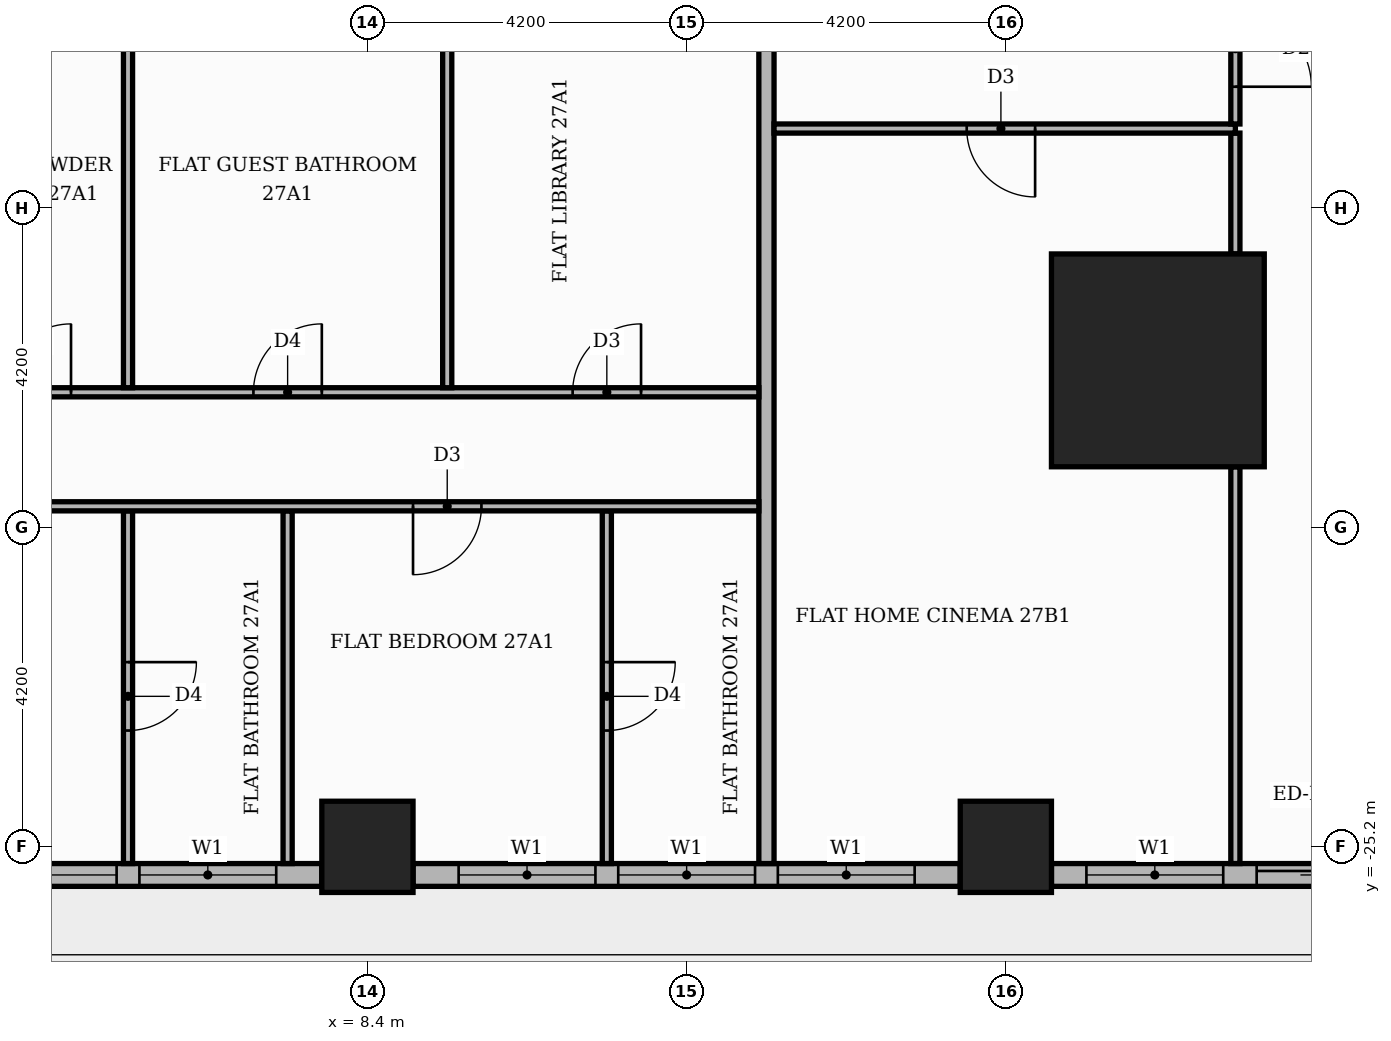
"""IFC4 building model, lengths in metres.
Left out: names, types, materials, properties, quantities, classifications, styles, units other than length and angle.
Written with IfcOpenShell. Run it as: python <this file> out.ifc"""

import sys

from ifc_helpers import new_model, si_unit, direction, frame, frame_2d, origin, origin_2d, place, context, subcontext, project, spatial, rectangle, extrude, element, fill, save


model = new_model("IFC4")
c1 = context("Model", 3, precision=1e-05, world=origin(), true_north=direction((0.0, 1.0)))
c2 = subcontext(c1, "Body", "Model", "MODEL_VIEW")
j1 = project(units=[si_unit("LENGTHUNIT", "METRE"), si_unit("PLANEANGLEUNIT", "RADIAN")], contexts=[c1])
p1 = place(None, origin())
s1 = spatial("IfcSite", under=j1, at=p1, CompositionType="ELEMENT")
p2 = place(p1, origin())
s2 = spatial("IfcBuilding", under=s1, at=p2, CompositionType="ELEMENT")
p3 = place(p2, frame((0.0, 0.0, 114.3)))
s3 = spatial("IfcBuildingStorey", under=s2, at=p3, CompositionType="ELEMENT", Elevation=114.3)
p4 = place(p3, frame((18.8, -18.8, 0.0), z_axis=(0.0, 0.0, 1.0), x_axis=(1.0, 0.0, 0.0)))
e1 = element("IfcColumn", 1, at=p4, inside=s3, PredefinedType="COLUMN", context=c2, shape_type="SweptSolid", body=[
    extrude(rectangle(XDim=2.8, YDim=2.8, at=origin_2d()), origin(), (0.0, 0.0, 1.0), 3.9),
])
for number, where, z_axis, x_axis in (
    (2, (8.4, -25.2, 0.0), (0.0, 0.0, 1.0), (1.0, 0.0, 0.0)),
    (3, (16.8, -25.2, 0.0), (0.0, 0.0, 1.0), (1.0, 0.0, 0.0)),
):
    element("IfcColumn", number, at=place(p3, frame(where, z_axis=z_axis, x_axis=x_axis)), inside=s3, PredefinedType="COLUMN", context=c2, shape_type="SweptSolid", body=[
        extrude(rectangle(XDim=1.2, YDim=1.2, at=origin_2d()), origin(), (0.0, 0.0, 1.0), 3.9),
    ])
p5 = place(p3, frame((0.6, -25.57, 0.0), z_axis=(0.0, 0.0, 1.0), x_axis=(1.0, 0.0, 0.0)))
e4 = element("IfcWall", 4, at=p5, inside=s3, PredefinedType="STANDARD", context=c2, shape_type="SweptSolid", body=[
    extrude(rectangle(XDim=7.2, YDim=0.3, at=frame_2d((3.6, 0.0))), origin(), (0.0, 0.0, 1.0), 3.48),
])
p6 = place(p5, frame((0.6, 0.0, 0.9)))
e5 = element("IfcOpeningElement", 5, at=p6, cuts=e4, PredefinedType="OPENING", context=c2, shape_type="SweptSolid", body=[
    extrude(rectangle(XDim=3.9, YDim=2.1, at=frame_2d((1.95, 1.05))), frame((0.0, 0.16, 0.0), z_axis=(0.0, -1.0, 0.0), x_axis=(1.0, 0.0, 0.0)), (0.0, 0.0, 1.0), 0.32),
])
p7 = place(p5, frame((4.8, 0.0, 0.9)))
e6 = element("IfcOpeningElement", 6, at=p7, cuts=e4, PredefinedType="OPENING", context=c2, shape_type="SweptSolid", body=[
    extrude(rectangle(XDim=1.8, YDim=2.1, at=frame_2d((0.9, 1.05))), frame((0.0, 0.16, 0.0), z_axis=(0.0, -1.0, 0.0), x_axis=(1.0, 0.0, 0.0)), (0.0, 0.0, 1.0), 0.32),
])
p8 = place(p3, frame((9.0, -25.57, 0.0), z_axis=(0.0, 0.0, 1.0), x_axis=(1.0, 0.0, 0.0)))
e7 = element("IfcWall", 7, at=p8, inside=s3, PredefinedType="STANDARD", context=c2, shape_type="SweptSolid", body=[
    extrude(rectangle(XDim=7.2, YDim=0.3, at=frame_2d((3.6, 0.0))), origin(), (0.0, 0.0, 1.0), 3.48),
])
p9 = place(p8, frame((0.6, 0.0, 0.9)))
e8 = element("IfcOpeningElement", 8, at=p9, cuts=e7, PredefinedType="OPENING", context=c2, shape_type="SweptSolid", body=[
    extrude(rectangle(XDim=1.8, YDim=2.1, at=frame_2d((0.9, 1.05))), frame((0.0, 0.16, 0.0), z_axis=(0.0, -1.0, 0.0), x_axis=(1.0, 0.0, 0.0)), (0.0, 0.0, 1.0), 0.32),
])
p10 = place(p8, frame((2.7, 0.0, 0.9)))
e9 = element("IfcOpeningElement", 9, at=p10, cuts=e7, PredefinedType="OPENING", context=c2, shape_type="SweptSolid", body=[
    extrude(rectangle(XDim=1.8, YDim=2.1, at=frame_2d((0.9, 1.05))), frame((0.0, 0.16, 0.0), z_axis=(0.0, -1.0, 0.0), x_axis=(1.0, 0.0, 0.0)), (0.0, 0.0, 1.0), 0.32),
])
p11 = place(p8, frame((4.8, 0.0, 0.9)))
e10 = element("IfcOpeningElement", 10, at=p11, cuts=e7, PredefinedType="OPENING", context=c2, shape_type="SweptSolid", body=[
    extrude(rectangle(XDim=1.8, YDim=2.1, at=frame_2d((0.9, 1.05))), frame((0.0, 0.16, 0.0), z_axis=(0.0, -1.0, 0.0), x_axis=(1.0, 0.0, 0.0)), (0.0, 0.0, 1.0), 0.32),
])
p12 = place(p3, frame((17.4, -25.57, 0.0), z_axis=(0.0, 0.0, 1.0), x_axis=(1.0, 0.0, 0.0)))
e11 = element("IfcWall", 11, at=p12, inside=s3, PredefinedType="STANDARD", context=c2, shape_type="SweptSolid", body=[
    extrude(rectangle(XDim=4.82, YDim=0.3, at=frame_2d((2.41, 0.0))), origin(), (0.0, 0.0, 1.0), 3.48),
])
p13 = place(p12, frame((2.7, 0.0, 0.0)))
e12 = element("IfcOpeningElement", 12, at=p13, cuts=e11, PredefinedType="OPENING", context=c2, shape_type="SweptSolid", body=[
    extrude(rectangle(XDim=1.8, YDim=2.4, at=frame_2d((0.9, 1.2))), frame((0.0, 0.16, 0.0), z_axis=(0.0, -1.0, 0.0), x_axis=(1.0, 0.0, 0.0)), (0.0, 0.0, 1.0), 0.32),
])
p14 = place(p12, frame((0.46, 0.0, 0.9)))
e13 = element("IfcOpeningElement", 13, at=p14, cuts=e11, PredefinedType="OPENING", context=c2, shape_type="SweptSolid", body=[
    extrude(rectangle(XDim=1.8, YDim=2.1, at=frame_2d((0.9, 1.05))), frame((0.0, 0.16, 0.0), z_axis=(0.0, -1.0, 0.0), x_axis=(1.0, 0.0, 0.0)), (0.0, 0.0, 1.0), 0.32),
])
p15 = place(p3, frame((5.25, -25.42, 0.0), z_axis=(0.0, 0.0, 1.0), x_axis=(0.0, 1.0, 0.0)))
e14 = element("IfcWall", 14, at=p15, inside=s3, PredefinedType="PARTITIONING", context=c2, shape_type="SweptSolid", body=[
    extrude(rectangle(XDim=4.64, YDim=0.12, at=frame_2d((2.32, 0.0))), origin(), (0.0, 0.0, 1.0), 3.48),
])
p16 = place(p15, frame((1.75, 0.0, 0.0)))
e15 = element("IfcOpeningElement", 15, at=p16, cuts=e14, PredefinedType="OPENING", context=c2, shape_type="SweptSolid", body=[
    extrude(rectangle(XDim=0.9, YDim=2.1, at=frame_2d((0.45, 1.05))), frame((0.0, 0.07, 0.0), z_axis=(0.0, -1.0, 0.0), x_axis=(1.0, 0.0, 0.0)), (0.0, 0.0, 1.0), 0.14),
])
p17 = place(p3, frame((7.35, -25.42, 0.0), z_axis=(0.0, 0.0, 1.0), x_axis=(0.0, 1.0, 0.0)))
e16 = element("IfcWall", 16, at=p17, inside=s3, PredefinedType="PARTITIONING", context=c2, shape_type="SweptSolid", body=[
    extrude(rectangle(XDim=4.64, YDim=0.12, at=frame_2d((2.32, 0.0))), origin(), (0.0, 0.0, 1.0), 3.48),
])
p18 = place(p3, frame((11.55, -25.42, 0.0), z_axis=(0.0, 0.0, 1.0), x_axis=(0.0, 1.0, 0.0)))
e17 = element("IfcWall", 17, at=p18, inside=s3, PredefinedType="PARTITIONING", context=c2, shape_type="SweptSolid", body=[
    extrude(rectangle(XDim=4.64, YDim=0.12, at=frame_2d((2.32, 0.0))), origin(), (0.0, 0.0, 1.0), 3.48),
])
p19 = place(p18, frame((1.75, 0.0, 0.0)))
e18 = element("IfcOpeningElement", 18, at=p19, cuts=e17, PredefinedType="OPENING", context=c2, shape_type="SweptSolid", body=[
    extrude(rectangle(XDim=0.9, YDim=2.1, at=frame_2d((0.45, 1.05))), frame((0.0, 0.07, 0.0), z_axis=(0.0, -1.0, 0.0), x_axis=(1.0, 0.0, 0.0)), (0.0, 0.0, 1.0), 0.14),
])
p20 = place(p3, frame((13.65, -25.42, 0.0), z_axis=(0.0, 0.0, 1.0), x_axis=(0.0, 1.0, 0.0)))
e19 = element("IfcWall", 19, at=p20, inside=s3, PredefinedType="PARTITIONING", context=c2, shape_type="SweptSolid", body=[
    extrude(rectangle(XDim=11.67, YDim=0.2, at=frame_2d((5.835, 0.0))), origin(), (0.0, 0.0, 1.0), 3.48),
])
p21 = place(p3, frame((19.82, -25.42, 0.0), z_axis=(0.0, 0.0, 1.0), x_axis=(0.0, 1.0, 0.0)))
e20 = element("IfcWall", 20, at=p21, inside=s3, PredefinedType="PARTITIONING", context=c2, shape_type="SweptSolid", body=[
    extrude(rectangle(XDim=5.22, YDim=0.12, at=frame_2d((2.61, 0.0))), origin(), (0.0, 0.0, 1.0), 3.48),
])
p22 = place(p3, frame((-25.42, -20.72, 0.0), z_axis=(0.0, 0.0, 1.0), x_axis=(1.0, 0.0, 0.0)))
e21 = element("IfcWall", 21, at=p22, inside=s3, PredefinedType="PARTITIONING", context=c2, shape_type="SweptSolid", body=[
    extrude(rectangle(XDim=38.97, YDim=0.12, at=frame_2d((19.485, 0.0))), origin(), (0.0, 0.0, 1.0), 3.48),
])
p23 = place(p22, frame((10.22, 0.0, 0.0)))
e22 = element("IfcOpeningElement", 22, at=p23, cuts=e21, PredefinedType="OPENING", context=c2, shape_type="SweptSolid", body=[
    extrude(rectangle(XDim=1.0, YDim=2.1, at=frame_2d((0.5, 1.05))), frame((0.0, 0.07, 0.0), z_axis=(0.0, -1.0, 0.0), x_axis=(1.0, 0.0, 0.0)), (0.0, 0.0, 1.0), 0.14),
])
p24 = place(p22, frame((14.47, 0.0, 0.0)))
e23 = element("IfcOpeningElement", 23, at=p24, cuts=e21, PredefinedType="OPENING", context=c2, shape_type="SweptSolid", body=[
    extrude(rectangle(XDim=0.9, YDim=2.1, at=frame_2d((0.45, 1.05))), frame((0.0, 0.07, 0.0), z_axis=(0.0, -1.0, 0.0), x_axis=(1.0, 0.0, 0.0)), (0.0, 0.0, 1.0), 0.14),
])
p25 = place(p22, frame((23.92, 0.0, 0.0)))
e24 = element("IfcOpeningElement", 24, at=p25, cuts=e21, PredefinedType="OPENING", context=c2, shape_type="SweptSolid", body=[
    extrude(rectangle(XDim=0.9, YDim=2.1, at=frame_2d((0.45, 1.05))), frame((0.0, 0.07, 0.0), z_axis=(0.0, -1.0, 0.0), x_axis=(1.0, 0.0, 0.0)), (0.0, 0.0, 1.0), 0.14),
])
p26 = place(p22, frame((28.12, 0.0, 0.0)))
e25 = element("IfcOpeningElement", 25, at=p26, cuts=e21, PredefinedType="OPENING", context=c2, shape_type="SweptSolid", body=[
    extrude(rectangle(XDim=0.9, YDim=2.1, at=frame_2d((0.45, 1.05))), frame((0.0, 0.07, 0.0), z_axis=(0.0, -1.0, 0.0), x_axis=(1.0, 0.0, 0.0)), (0.0, 0.0, 1.0), 0.14),
])
p27 = place(p22, frame((34.42, 0.0, 0.0)))
e26 = element("IfcOpeningElement", 26, at=p27, cuts=e21, PredefinedType="OPENING", context=c2, shape_type="SweptSolid", body=[
    extrude(rectangle(XDim=0.9, YDim=2.1, at=frame_2d((0.45, 1.05))), frame((0.0, 0.07, 0.0), z_axis=(0.0, -1.0, 0.0), x_axis=(1.0, 0.0, 0.0)), (0.0, 0.0, 1.0), 0.14),
])
p28 = place(p3, frame((-9.45, -19.22, 0.0), z_axis=(0.0, 0.0, 1.0), x_axis=(1.0, 0.0, 0.0)))
e27 = element("IfcWall", 27, at=p28, inside=s3, PredefinedType="PARTITIONING", context=c2, shape_type="SweptSolid", body=[
    extrude(rectangle(XDim=23.0, YDim=0.12, at=frame_2d((11.5, 0.0))), origin(), (0.0, 0.0, 1.0), 3.48),
])
p29 = place(p28, frame((2.7, 0.0, 0.0)))
e28 = element("IfcOpeningElement", 28, at=p29, cuts=e27, PredefinedType="OPENING", context=c2, shape_type="SweptSolid", body=[
    extrude(rectangle(XDim=0.9, YDim=2.1, at=frame_2d((0.45, 1.05))), frame((0.0, 0.07, 0.0), z_axis=(0.0, -1.0, 0.0), x_axis=(1.0, 0.0, 0.0)), (0.0, 0.0, 1.0), 0.14),
])
p30 = place(p28, frame((8.85, 0.0, 0.0)))
e29 = element("IfcOpeningElement", 29, at=p30, cuts=e27, PredefinedType="OPENING", context=c2, shape_type="SweptSolid", body=[
    extrude(rectangle(XDim=0.9, YDim=2.1, at=frame_2d((0.45, 1.05))), frame((0.0, 0.07, 0.0), z_axis=(0.0, -1.0, 0.0), x_axis=(1.0, 0.0, 0.0)), (0.0, 0.0, 1.0), 0.14),
])
p31 = place(p28, frame((13.05, 0.0, 0.0)))
e30 = element("IfcOpeningElement", 30, at=p31, cuts=e27, PredefinedType="OPENING", context=c2, shape_type="SweptSolid", body=[
    extrude(rectangle(XDim=0.9, YDim=2.1, at=frame_2d((0.45, 1.05))), frame((0.0, 0.07, 0.0), z_axis=(0.0, -1.0, 0.0), x_axis=(1.0, 0.0, 0.0)), (0.0, 0.0, 1.0), 0.14),
])
p32 = place(p28, frame((16.35, 0.0, 0.0)))
e31 = element("IfcOpeningElement", 31, at=p32, cuts=e27, PredefinedType="OPENING", context=c2, shape_type="SweptSolid", body=[
    extrude(rectangle(XDim=0.9, YDim=2.1, at=frame_2d((0.45, 1.05))), frame((0.0, 0.07, 0.0), z_axis=(0.0, -1.0, 0.0), x_axis=(1.0, 0.0, 0.0)), (0.0, 0.0, 1.0), 0.14),
])
p33 = place(p28, frame((20.55, 0.0, 0.0)))
e32 = element("IfcOpeningElement", 32, at=p33, cuts=e27, PredefinedType="OPENING", context=c2, shape_type="SweptSolid", body=[
    extrude(rectangle(XDim=0.9, YDim=2.1, at=frame_2d((0.45, 1.05))), frame((0.0, 0.07, 0.0), z_axis=(0.0, -1.0, 0.0), x_axis=(1.0, 0.0, 0.0)), (0.0, 0.0, 1.0), 0.14),
])
for number, where, z_axis, x_axis in (
    (33, (5.25, -19.16, 0.0), (0.0, 0.0, 1.0), (0.0, 1.0, 0.0)),
    (34, (9.45, -19.16, 0.0), (0.0, 0.0, 1.0), (0.0, 1.0, 0.0)),
):
    element("IfcWall", number, at=place(p3, frame(where, z_axis=z_axis, x_axis=x_axis)), inside=s3, PredefinedType="PARTITIONING", context=c2, shape_type="SweptSolid", body=[
        extrude(rectangle(XDim=5.41, YDim=0.12, at=frame_2d((2.705, 0.0))), origin(), (0.0, 0.0, 1.0), 3.48),
    ])
p34 = place(p3, frame((19.82, -17.4, 0.0), z_axis=(0.0, 0.0, 1.0), x_axis=(0.0, 1.0, 0.0)))
e35 = element("IfcWall", 35, at=p34, inside=s3, PredefinedType="PARTITIONING", context=c2, shape_type="SweptSolid", body=[
    extrude(rectangle(XDim=1.59, YDim=0.12, at=frame_2d((0.795, 0.0))), origin(), (0.0, 0.0, 1.0), 3.48),
])
p35 = place(p3, frame((13.75, -15.75, 0.0), z_axis=(0.0, 0.0, 1.0), x_axis=(1.0, 0.0, 0.0)))
e36 = element("IfcWall", 36, at=p35, inside=s3, PredefinedType="PARTITIONING", context=c2, shape_type="SweptSolid", body=[
    extrude(rectangle(XDim=6.07, YDim=0.12, at=frame_2d((3.035, 0.0))), origin(), (0.0, 0.0, 1.0), 3.48),
])
p36 = place(p35, frame((2.535, 0.0, 0.0)))
e37 = element("IfcOpeningElement", 37, at=p36, cuts=e36, PredefinedType="OPENING", context=c2, shape_type="SweptSolid", body=[
    extrude(rectangle(XDim=0.9, YDim=2.1, at=frame_2d((0.45, 1.05))), frame((0.0, 0.07, 0.0), z_axis=(0.0, -1.0, 0.0), x_axis=(1.0, 0.0, 0.0)), (0.0, 0.0, 1.0), 0.14),
])
p37 = place(p3, frame((19.82, -15.69, 0.0), z_axis=(0.0, 0.0, 1.0), x_axis=(0.0, 1.0, 0.0)))
e38 = element("IfcWall", 38, at=p37, inside=s3, PredefinedType="PARTITIONING", context=c2, shape_type="SweptSolid", body=[
    extrude(rectangle(XDim=1.98, YDim=0.12, at=frame_2d((0.99, 0.0))), origin(), (0.0, 0.0, 1.0), 3.48),
])
p38 = place(p37, frame((0.49, 0.0, 0.0)))
e39 = element("IfcOpeningElement", 39, at=p38, cuts=e38, PredefinedType="OPENING", context=c2, shape_type="SweptSolid", body=[
    extrude(rectangle(XDim=1.0, YDim=2.1, at=frame_2d((0.5, 1.05))), frame((0.0, 0.07, 0.0), z_axis=(0.0, -1.0, 0.0), x_axis=(1.0, 0.0, 0.0)), (0.0, 0.0, 1.0), 0.14),
])
p39 = place(p6, origin())
e40 = element("IfcWindow", 40, at=p39, inside=s3, PartitioningType="SINGLE_PANEL", PredefinedType="WINDOW", context=c2, shape_type="SweptSolid", body=[
    extrude(rectangle(XDim=3.9, YDim=2.1, at=frame_2d((1.95, 1.05))), frame((0.0, 0.03, 0.0), z_axis=(0.0, -1.0, 0.0), x_axis=(1.0, 0.0, 0.0)), (0.0, 0.0, 1.0), 0.06),
])
fill(e5, e40)
p40 = place(p7, origin())
e41 = element("IfcWindow", 41, at=p40, inside=s3, PartitioningType="SINGLE_PANEL", PredefinedType="WINDOW", context=c2, shape_type="SweptSolid", body=[
    extrude(rectangle(XDim=1.8, YDim=2.1, at=frame_2d((0.9, 1.05))), frame((0.0, 0.03, 0.0), z_axis=(0.0, -1.0, 0.0), x_axis=(1.0, 0.0, 0.0)), (0.0, 0.0, 1.0), 0.06),
])
fill(e6, e41)
p41 = place(p9, origin())
e42 = element("IfcWindow", 42, at=p41, inside=s3, PartitioningType="SINGLE_PANEL", PredefinedType="WINDOW", context=c2, shape_type="SweptSolid", body=[
    extrude(rectangle(XDim=1.8, YDim=2.1, at=frame_2d((0.9, 1.05))), frame((0.0, 0.03, 0.0), z_axis=(0.0, -1.0, 0.0), x_axis=(1.0, 0.0, 0.0)), (0.0, 0.0, 1.0), 0.06),
])
fill(e8, e42)
p42 = place(p10, origin())
e43 = element("IfcWindow", 43, at=p42, inside=s3, PartitioningType="SINGLE_PANEL", PredefinedType="WINDOW", context=c2, shape_type="SweptSolid", body=[
    extrude(rectangle(XDim=1.8, YDim=2.1, at=frame_2d((0.9, 1.05))), frame((0.0, 0.03, 0.0), z_axis=(0.0, -1.0, 0.0), x_axis=(1.0, 0.0, 0.0)), (0.0, 0.0, 1.0), 0.06),
])
fill(e9, e43)
p43 = place(p11, origin())
e44 = element("IfcWindow", 44, at=p43, inside=s3, PartitioningType="SINGLE_PANEL", PredefinedType="WINDOW", context=c2, shape_type="SweptSolid", body=[
    extrude(rectangle(XDim=1.8, YDim=2.1, at=frame_2d((0.9, 1.05))), frame((0.0, 0.03, 0.0), z_axis=(0.0, -1.0, 0.0), x_axis=(1.0, 0.0, 0.0)), (0.0, 0.0, 1.0), 0.06),
])
fill(e10, e44)
p44 = place(p13, origin())
e45 = element("IfcDoor", 45, at=p44, inside=s3, OperationType="SLIDING_TO_LEFT", PredefinedType="DOOR", context=c2, shape_type="SweptSolid", body=[
    extrude(rectangle(XDim=1.8, YDim=2.4, at=frame_2d((0.9, 1.2))), frame((0.0, 0.025, 0.0), z_axis=(0.0, -1.0, 0.0), x_axis=(1.0, 0.0, 0.0)), (0.0, 0.0, 1.0), 0.05),
])
fill(e12, e45)
p45 = place(p14, origin())
e46 = element("IfcWindow", 46, at=p45, inside=s3, PartitioningType="SINGLE_PANEL", PredefinedType="WINDOW", context=c2, shape_type="SweptSolid", body=[
    extrude(rectangle(XDim=1.8, YDim=2.1, at=frame_2d((0.9, 1.05))), frame((0.0, 0.03, 0.0), z_axis=(0.0, -1.0, 0.0), x_axis=(1.0, 0.0, 0.0)), (0.0, 0.0, 1.0), 0.06),
])
fill(e13, e46)
p46 = place(p31, origin())
e47 = element("IfcDoor", 47, at=p46, inside=s3, OperationType="SINGLE_SWING_RIGHT", PredefinedType="DOOR", context=c2, shape_type="SweptSolid", body=[
    extrude(rectangle(XDim=0.9, YDim=2.1, at=frame_2d((0.45, 1.05))), frame((0.0, 0.025, 0.0), z_axis=(0.0, -1.0, 0.0), x_axis=(1.0, 0.0, 0.0)), (0.0, 0.0, 1.0), 0.05),
])
fill(e30, e47)
p47 = place(p32, origin())
e48 = element("IfcDoor", 48, at=p47, inside=s3, OperationType="SINGLE_SWING_RIGHT", PredefinedType="DOOR", context=c2, shape_type="SweptSolid", body=[
    extrude(rectangle(XDim=0.9, YDim=2.1, at=frame_2d((0.45, 1.05))), frame((0.0, 0.025, 0.0), z_axis=(0.0, -1.0, 0.0), x_axis=(1.0, 0.0, 0.0)), (0.0, 0.0, 1.0), 0.05),
])
fill(e31, e48)
p48 = place(p33, origin())
e49 = element("IfcDoor", 49, at=p48, inside=s3, OperationType="SINGLE_SWING_RIGHT", PredefinedType="DOOR", context=c2, shape_type="SweptSolid", body=[
    extrude(rectangle(XDim=0.9, YDim=2.1, at=frame_2d((0.45, 1.05))), frame((0.0, 0.025, 0.0), z_axis=(0.0, -1.0, 0.0), x_axis=(1.0, 0.0, 0.0)), (0.0, 0.0, 1.0), 0.05),
])
fill(e32, e49)
p49 = place(p16, frame((0.9, 0.0, 0.0), z_axis=(0.0, 0.0, 1.0), x_axis=(-1.0, 0.0, 0.0)))
e50 = element("IfcDoor", 50, at=p49, inside=s3, OperationType="SINGLE_SWING_RIGHT", PredefinedType="DOOR", context=c2, shape_type="SweptSolid", body=[
    extrude(rectangle(XDim=0.9, YDim=2.1, at=frame_2d((0.45, 1.05))), frame((0.0, 0.025, 0.0), z_axis=(0.0, -1.0, 0.0), x_axis=(1.0, 0.0, 0.0)), (0.0, 0.0, 1.0), 0.05),
])
fill(e15, e50)
p50 = place(p27, frame((0.9, 0.0, 0.0), z_axis=(0.0, 0.0, 1.0), x_axis=(-1.0, 0.0, 0.0)))
e51 = element("IfcDoor", 51, at=p50, inside=s3, OperationType="SINGLE_SWING_LEFT", PredefinedType="DOOR", context=c2, shape_type="SweptSolid", body=[
    extrude(rectangle(XDim=0.9, YDim=2.1, at=frame_2d((0.45, 1.05))), frame((0.0, 0.025, 0.0), z_axis=(0.0, -1.0, 0.0), x_axis=(1.0, 0.0, 0.0)), (0.0, 0.0, 1.0), 0.05),
])
fill(e26, e51)
p51 = place(p19, frame((0.9, 0.0, 0.0), z_axis=(0.0, 0.0, 1.0), x_axis=(-1.0, 0.0, 0.0)))
e52 = element("IfcDoor", 52, at=p51, inside=s3, OperationType="SINGLE_SWING_RIGHT", PredefinedType="DOOR", context=c2, shape_type="SweptSolid", body=[
    extrude(rectangle(XDim=0.9, YDim=2.1, at=frame_2d((0.45, 1.05))), frame((0.0, 0.025, 0.0), z_axis=(0.0, -1.0, 0.0), x_axis=(1.0, 0.0, 0.0)), (0.0, 0.0, 1.0), 0.05),
])
fill(e18, e52)
p52 = place(p36, frame((0.9, 0.0, 0.0), z_axis=(0.0, 0.0, 1.0), x_axis=(-1.0, 0.0, 0.0)))
e53 = element("IfcDoor", 53, at=p52, inside=s3, OperationType="SINGLE_SWING_RIGHT", PredefinedType="DOOR", context=c2, shape_type="SweptSolid", body=[
    extrude(rectangle(XDim=0.9, YDim=2.1, at=frame_2d((0.45, 1.05))), frame((0.0, 0.025, 0.0), z_axis=(0.0, -1.0, 0.0), x_axis=(1.0, 0.0, 0.0)), (0.0, 0.0, 1.0), 0.05),
])
fill(e37, e53)
p53 = place(p38, frame((1.0, 0.0, 0.0), z_axis=(0.0, 0.0, 1.0), x_axis=(-1.0, 0.0, 0.0)))
e54 = element("IfcDoor", 54, at=p53, inside=s3, OperationType="SINGLE_SWING_LEFT", PredefinedType="DOOR", context=c2, shape_type="SweptSolid", body=[
    extrude(rectangle(XDim=1.0, YDim=2.1, at=frame_2d((0.5, 1.05))), frame((0.0, 0.025, 0.0), z_axis=(0.0, -1.0, 0.0), x_axis=(1.0, 0.0, 0.0)), (0.0, 0.0, 1.0), 0.05),
])
fill(e39, e54)
save(model, sys.argv[1])
